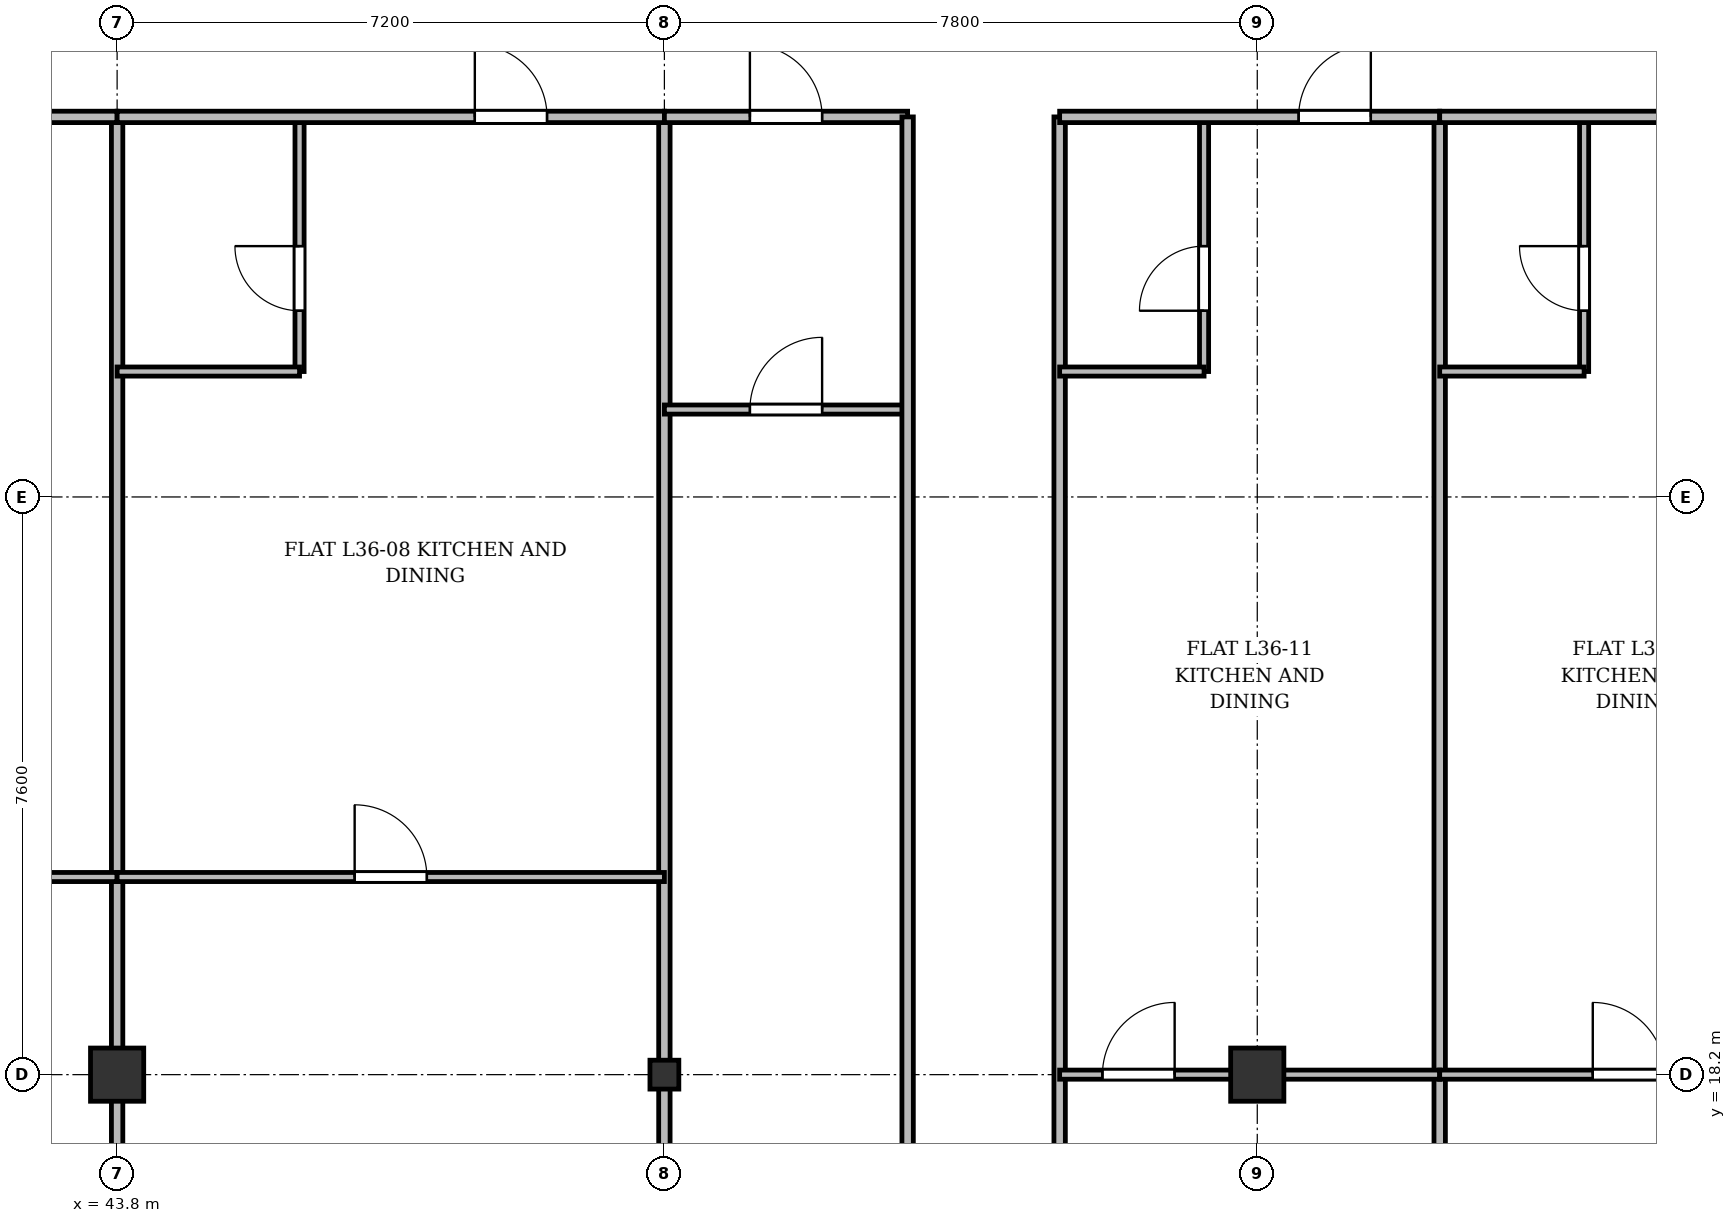
"""IFC4 building model, lengths in metres.
Left out: names, types, materials, properties, quantities, classifications, styles, units other than length and angle.
Written with IfcOpenShell. Run it as: python <this file> out.ifc"""

import sys

from ifc_helpers import new_model, si_unit, direction, frame, frame_2d, origin, origin_2d, place, context, subcontext, project, spatial, rectangle, i_section, extrude, source, transform, mapped, element, fill, save


model = new_model("IFC4")
c1 = context("Model", 3, precision=1e-05, world=origin(), true_north=direction((0.0, 1.0)))
c2 = subcontext(c1, "Body", "Model", "MODEL_VIEW")
j1 = project(units=[si_unit("LENGTHUNIT", "METRE"), si_unit("PLANEANGLEUNIT", "RADIAN")], contexts=[c1])
p1 = place(None, origin())
s1 = spatial("IfcSite", under=j1, at=p1, CompositionType="ELEMENT")
p2 = place(p1, origin())
s2 = spatial("IfcBuilding", under=s1, at=p2, CompositionType="ELEMENT")
p3 = place(p2, frame((0.0, 0.0, 139.3)))
s3 = spatial("IfcBuildingStorey", under=s2, at=p3, CompositionType="ELEMENT", Elevation=139.3)
m1 = source(origin(), c2, "Body", "SweptSolid", [
    extrude(rectangle(XDim=0.7, YDim=0.7, at=origin_2d()), origin(), (0.0, 0.0, 1.0), 3.6),
])
p4 = place(p3, frame((43.8, 18.2, 0.0), z_axis=(0.0, 0.0, 1.0), x_axis=(1.0, 0.0, 0.0)))
e1 = element("IfcColumn", 1, at=p4, inside=s3, PredefinedType="COLUMN", context=c2, shape_type="MappedRepresentation", body=[
    mapped(m1, transform((0.0, 0.0, 0.0), x_axis=(1.0, 0.0, 0.0), y_axis=(0.0, 1.0, 0.0), z_axis=(0.0, 0.0, 1.0), scale=1.0)),
])
m2 = source(origin(), c2, "Body", "SweptSolid", [
    extrude(i_section(OverallWidth=0.38, OverallDepth=0.38, WebThickness=0.02, FlangeThickness=0.03, at=origin_2d()), origin(), (0.0, 0.0, 1.0), 3.6),
])
p5 = place(p3, frame((51.0, 18.2, 0.0), z_axis=(0.0, 0.0, 1.0), x_axis=(1.0, 0.0, 0.0)))
e2 = element("IfcColumn", 2, at=p5, inside=s3, PredefinedType="COLUMN", context=c2, shape_type="MappedRepresentation", body=[
    mapped(m2, transform((0.0, 0.0, 0.0), x_axis=(1.0, 0.0, 0.0), y_axis=(0.0, 1.0, 0.0), z_axis=(0.0, 0.0, 1.0), scale=1.0)),
])
p6 = place(p3, frame((58.8, 18.2, 0.0), z_axis=(0.0, 0.0, 1.0), x_axis=(1.0, 0.0, 0.0)))
e3 = element("IfcColumn", 3, at=p6, inside=s3, PredefinedType="COLUMN", context=c2, shape_type="MappedRepresentation", body=[
    mapped(m1, transform((0.0, 0.0, 0.0), x_axis=(1.0, 0.0, 0.0), y_axis=(0.0, 1.0, 0.0), z_axis=(0.0, 0.0, 1.0), scale=1.0)),
])
for number, where, z_axis, x_axis in (
    (4, (43.8, 3.525, 0.0), (0.0, 0.0, 1.0), (0.0, 1.0, 0.0)),
    (5, (51.0, 3.525, 0.0), (0.0, 0.0, 1.0), (0.0, 1.0, 0.0)),
):
    element("IfcWall", number, at=place(p3, frame(where, z_axis=z_axis, x_axis=x_axis)), inside=s3, PredefinedType="PARTITIONING", context=c2, shape_type="SweptSolid", body=[
        extrude(rectangle(XDim=27.275, YDim=0.15, at=frame_2d((13.638, 0.0))), origin(), (0.0, 0.0, 1.0), 2.85),
    ])
p7 = place(p3, frame((61.2, 3.525, 0.0), z_axis=(0.0, 0.0, 1.0), x_axis=(0.0, 1.0, 0.0)))
e6 = element("IfcWall", 6, at=p7, inside=s3, PredefinedType="PARTITIONING", context=c2, shape_type="SweptSolid", body=[
    extrude(rectangle(XDim=27.275, YDim=0.15, at=frame_2d((13.638, 0.0))), origin(), (0.0, 0.0, 1.0), 2.75),
])
p8 = place(p3, frame((37.2, 20.8, 0.0), z_axis=(0.0, 0.0, 1.0), x_axis=(1.0, 0.0, 0.0)))
e7 = element("IfcWall", 7, at=p8, inside=s3, PredefinedType="PARTITIONING", context=c2, shape_type="SweptSolid", body=[
    extrude(rectangle(XDim=6.6, YDim=0.12, at=frame_2d((3.3, 0.0))), origin(), (0.0, 0.0, 1.0), 2.85),
])
p9 = place(p8, frame((2.734, 0.0, 0.0)))
e8 = element("IfcOpeningElement", 8, at=p9, cuts=e7, PredefinedType="OPENING", context=c2, shape_type="SweptSolid", body=[
    extrude(rectangle(XDim=0.95, YDim=2.15, at=frame_2d((0.475, 1.075))), frame((0.0, 0.07, 0.0), z_axis=(0.0, -1.0, 0.0), x_axis=(1.0, 0.0, 0.0)), (0.0, 0.0, 1.0), 0.14),
])
p10 = place(p3, frame((37.2, 30.8, 0.0), z_axis=(0.0, 0.0, 1.0), x_axis=(1.0, 0.0, 0.0)))
e9 = element("IfcWall", 9, at=p10, inside=s3, PredefinedType="PARTITIONING", context=c2, shape_type="SweptSolid", body=[
    extrude(rectangle(XDim=6.6, YDim=0.15, at=frame_2d((3.3, 0.0))), origin(), (0.0, 0.0, 1.0), 2.85),
])
p11 = place(p10, frame((4.337, 0.0, 0.0)))
e10 = element("IfcOpeningElement", 10, at=p11, cuts=e9, PredefinedType="OPENING", context=c2, shape_type="SweptSolid", body=[
    extrude(rectangle(XDim=0.95, YDim=2.15, at=frame_2d((0.475, 1.075))), frame((0.0, 0.085, 0.0), z_axis=(0.0, -1.0, 0.0), x_axis=(1.0, 0.0, 0.0)), (0.0, 0.0, 1.0), 0.17),
])
p12 = place(p3, frame((43.8, 20.8, 0.0), z_axis=(0.0, 0.0, 1.0), x_axis=(1.0, 0.0, 0.0)))
e11 = element("IfcWall", 11, at=p12, inside=s3, PredefinedType="PARTITIONING", context=c2, shape_type="SweptSolid", body=[
    extrude(rectangle(XDim=7.2, YDim=0.12, at=frame_2d((3.6, 0.0))), origin(), (0.0, 0.0, 1.0), 2.85),
])
p13 = place(p12, frame((3.125, 0.0, 0.0)))
e12 = element("IfcOpeningElement", 12, at=p13, cuts=e11, PredefinedType="OPENING", context=c2, shape_type="SweptSolid", body=[
    extrude(rectangle(XDim=0.95, YDim=2.15, at=frame_2d((0.475, 1.075))), frame((0.0, 0.07, 0.0), z_axis=(0.0, -1.0, 0.0), x_axis=(1.0, 0.0, 0.0)), (0.0, 0.0, 1.0), 0.14),
])
p14 = place(p3, frame((46.2, 27.45, 0.0), z_axis=(0.0, 0.0, 1.0), x_axis=(0.0, 1.0, 0.0)))
e13 = element("IfcWall", 13, at=p14, inside=s3, PredefinedType="PARTITIONING", context=c2, shape_type="SweptSolid", body=[
    extrude(rectangle(XDim=3.35, YDim=0.12, at=frame_2d((1.675, 0.0))), origin(), (0.0, 0.0, 1.0), 3.35),
])
p15 = place(p14, frame((0.8, 0.0, 0.0)))
e14 = element("IfcOpeningElement", 14, at=p15, cuts=e13, PredefinedType="OPENING", context=c2, shape_type="SweptSolid", body=[
    extrude(rectangle(XDim=0.85, YDim=2.1, at=frame_2d((0.425, 1.05))), frame((0.0, 0.07, 0.0), z_axis=(0.0, -1.0, 0.0), x_axis=(1.0, 0.0, 0.0)), (0.0, 0.0, 1.0), 0.14),
])
p16 = place(p3, frame((43.8, 27.45, 0.0), z_axis=(0.0, 0.0, 1.0), x_axis=(1.0, 0.0, 0.0)))
e15 = element("IfcWall", 15, at=p16, inside=s3, PredefinedType="PARTITIONING", context=c2, shape_type="SweptSolid", body=[
    extrude(rectangle(XDim=2.4, YDim=0.12, at=frame_2d((1.2, 0.0))), origin(), (0.0, 0.0, 1.0), 2.85),
])
p17 = place(p3, frame((43.8, 30.8, 0.0), z_axis=(0.0, 0.0, 1.0), x_axis=(1.0, 0.0, 0.0)))
e16 = element("IfcWall", 16, at=p17, inside=s3, PredefinedType="PARTITIONING", context=c2, shape_type="SweptSolid", body=[
    extrude(rectangle(XDim=7.2, YDim=0.15, at=frame_2d((3.6, 0.0))), origin(), (0.0, 0.0, 1.0), 2.85),
])
p18 = place(p17, frame((4.706, 0.0, 0.0)))
e17 = element("IfcOpeningElement", 17, at=p18, cuts=e16, PredefinedType="OPENING", context=c2, shape_type="SweptSolid", body=[
    extrude(rectangle(XDim=0.95, YDim=2.15, at=frame_2d((0.475, 1.075))), frame((0.0, 0.085, 0.0), z_axis=(0.0, -1.0, 0.0), x_axis=(1.0, 0.0, 0.0)), (0.0, 0.0, 1.0), 0.17),
])
p19 = place(p3, frame((51.0, 30.8, 0.0), z_axis=(0.0, 0.0, 1.0), x_axis=(1.0, 0.0, 0.0)))
e18 = element("IfcWall", 18, at=p19, inside=s3, PredefinedType="PARTITIONING", context=c2, shape_type="SweptSolid", body=[
    extrude(rectangle(XDim=3.2, YDim=0.15, at=frame_2d((1.6, 0.0))), origin(), (0.0, 0.0, 1.0), 2.85),
])
p20 = place(p19, frame((1.125, 0.0, 0.0)))
e19 = element("IfcOpeningElement", 19, at=p20, cuts=e18, PredefinedType="OPENING", context=c2, shape_type="SweptSolid", body=[
    extrude(rectangle(XDim=0.95, YDim=2.15, at=frame_2d((0.475, 1.075))), frame((0.0, 0.085, 0.0), z_axis=(0.0, -1.0, 0.0), x_axis=(1.0, 0.0, 0.0)), (0.0, 0.0, 1.0), 0.17),
])
p21 = place(p3, frame((51.0, 26.95, 0.0), z_axis=(0.0, 0.0, 1.0), x_axis=(1.0, 0.0, 0.0)))
e20 = element("IfcWall", 20, at=p21, inside=s3, PredefinedType="PARTITIONING", context=c2, shape_type="SweptSolid", body=[
    extrude(rectangle(XDim=3.2, YDim=0.12, at=frame_2d((1.6, 0.0))), origin(), (0.0, 0.0, 1.0), 2.85),
])
p22 = place(p21, frame((1.125, 0.0, 0.0)))
e21 = element("IfcOpeningElement", 21, at=p22, cuts=e20, PredefinedType="OPENING", context=c2, shape_type="SweptSolid", body=[
    extrude(rectangle(XDim=0.95, YDim=2.15, at=frame_2d((0.475, 1.075))), frame((0.0, 0.07, 0.0), z_axis=(0.0, -1.0, 0.0), x_axis=(1.0, 0.0, 0.0)), (0.0, 0.0, 1.0), 0.14),
])
for number, where, z_axis, x_axis in (
    (22, (54.2, 3.525, 0.0), (0.0, 0.0, 1.0), (0.0, 1.0, 0.0)),
    (23, (56.2, 3.525, 0.0), (0.0, 0.0, 1.0), (0.0, 1.0, 0.0)),
):
    element("IfcWall", number, at=place(p3, frame(where, z_axis=z_axis, x_axis=x_axis)), inside=s3, PredefinedType="PARTITIONING", context=c2, shape_type="SweptSolid", body=[
        extrude(rectangle(XDim=27.275, YDim=0.15, at=frame_2d((13.638, 0.0))), origin(), (0.0, 0.0, 1.0), 2.75),
    ])
p23 = place(p3, frame((56.2, 18.2, 0.0), z_axis=(0.0, 0.0, 1.0), x_axis=(1.0, 0.0, 0.0)))
e24 = element("IfcWall", 24, at=p23, inside=s3, PredefinedType="PARTITIONING", context=c2, shape_type="SweptSolid", body=[
    extrude(rectangle(XDim=5.0, YDim=0.12, at=frame_2d((2.5, 0.0))), origin(), (0.0, 0.0, 1.0), 2.75),
])
p24 = place(p23, frame((0.563, 0.0, 0.0)))
e25 = element("IfcOpeningElement", 25, at=p24, cuts=e24, PredefinedType="OPENING", context=c2, shape_type="SweptSolid", body=[
    extrude(rectangle(XDim=0.95, YDim=2.15, at=frame_2d((0.475, 1.075))), frame((0.0, 0.07, 0.0), z_axis=(0.0, -1.0, 0.0), x_axis=(1.0, 0.0, 0.0)), (0.0, 0.0, 1.0), 0.14),
])
p25 = place(p3, frame((58.1, 27.45, 0.0), z_axis=(0.0, 0.0, 1.0), x_axis=(0.0, 1.0, 0.0)))
e26 = element("IfcWall", 26, at=p25, inside=s3, PredefinedType="PARTITIONING", context=c2, shape_type="SweptSolid", body=[
    extrude(rectangle(XDim=3.35, YDim=0.12, at=frame_2d((1.675, 0.0))), origin(), (0.0, 0.0, 1.0), 3.35),
])
p26 = place(p25, frame((0.8, 0.0, 0.0)))
e27 = element("IfcOpeningElement", 27, at=p26, cuts=e26, PredefinedType="OPENING", context=c2, shape_type="SweptSolid", body=[
    extrude(rectangle(XDim=0.85, YDim=2.1, at=frame_2d((0.425, 1.05))), frame((0.0, 0.07, 0.0), z_axis=(0.0, -1.0, 0.0), x_axis=(1.0, 0.0, 0.0)), (0.0, 0.0, 1.0), 0.14),
])
p27 = place(p3, frame((56.2, 27.45, 0.0), z_axis=(0.0, 0.0, 1.0), x_axis=(1.0, 0.0, 0.0)))
e28 = element("IfcWall", 28, at=p27, inside=s3, PredefinedType="PARTITIONING", context=c2, shape_type="SweptSolid", body=[
    extrude(rectangle(XDim=1.9, YDim=0.12, at=frame_2d((0.95, 0.0))), origin(), (0.0, 0.0, 1.0), 3.35),
])
p28 = place(p3, frame((56.2, 30.8, 0.0), z_axis=(0.0, 0.0, 1.0), x_axis=(1.0, 0.0, 0.0)))
e29 = element("IfcWall", 29, at=p28, inside=s3, PredefinedType="PARTITIONING", context=c2, shape_type="SweptSolid", body=[
    extrude(rectangle(XDim=5.0, YDim=0.15, at=frame_2d((2.5, 0.0))), origin(), (0.0, 0.0, 1.0), 2.85),
])
p29 = place(p28, frame((3.144, 0.0, 0.0)))
e30 = element("IfcOpeningElement", 30, at=p29, cuts=e29, PredefinedType="OPENING", context=c2, shape_type="SweptSolid", body=[
    extrude(rectangle(XDim=0.95, YDim=2.15, at=frame_2d((0.475, 1.075))), frame((0.0, 0.085, 0.0), z_axis=(0.0, -1.0, 0.0), x_axis=(1.0, 0.0, 0.0)), (0.0, 0.0, 1.0), 0.17),
])
p30 = place(p3, frame((61.2, 18.2, 0.0), z_axis=(0.0, 0.0, 1.0), x_axis=(1.0, 0.0, 0.0)))
e31 = element("IfcWall", 31, at=p30, inside=s3, PredefinedType="PARTITIONING", context=c2, shape_type="SweptSolid", body=[
    extrude(rectangle(XDim=5.16, YDim=0.12, at=frame_2d((2.58, 0.0))), origin(), (0.0, 0.0, 1.0), 2.75),
])
p31 = place(p30, frame((2.014, 0.0, 0.0)))
e32 = element("IfcOpeningElement", 32, at=p31, cuts=e31, PredefinedType="OPENING", context=c2, shape_type="SweptSolid", body=[
    extrude(rectangle(XDim=0.95, YDim=2.15, at=frame_2d((0.475, 1.075))), frame((0.0, 0.07, 0.0), z_axis=(0.0, -1.0, 0.0), x_axis=(1.0, 0.0, 0.0)), (0.0, 0.0, 1.0), 0.14),
])
p32 = place(p3, frame((63.1, 27.45, 0.0), z_axis=(0.0, 0.0, 1.0), x_axis=(0.0, 1.0, 0.0)))
e33 = element("IfcWall", 33, at=p32, inside=s3, PredefinedType="PARTITIONING", context=c2, shape_type="SweptSolid", body=[
    extrude(rectangle(XDim=3.35, YDim=0.12, at=frame_2d((1.675, 0.0))), origin(), (0.0, 0.0, 1.0), 3.35),
])
p33 = place(p32, frame((0.8, 0.0, 0.0)))
e34 = element("IfcOpeningElement", 34, at=p33, cuts=e33, PredefinedType="OPENING", context=c2, shape_type="SweptSolid", body=[
    extrude(rectangle(XDim=0.85, YDim=2.1, at=frame_2d((0.425, 1.05))), frame((0.0, 0.07, 0.0), z_axis=(0.0, -1.0, 0.0), x_axis=(1.0, 0.0, 0.0)), (0.0, 0.0, 1.0), 0.14),
])
p34 = place(p3, frame((61.2, 27.45, 0.0), z_axis=(0.0, 0.0, 1.0), x_axis=(1.0, 0.0, 0.0)))
e35 = element("IfcWall", 35, at=p34, inside=s3, PredefinedType="PARTITIONING", context=c2, shape_type="SweptSolid", body=[
    extrude(rectangle(XDim=1.9, YDim=0.12, at=frame_2d((0.95, 0.0))), origin(), (0.0, 0.0, 1.0), 3.35),
])
p35 = place(p3, frame((61.2, 30.8, 0.0), z_axis=(0.0, 0.0, 1.0), x_axis=(1.0, 0.0, 0.0)))
e36 = element("IfcWall", 36, at=p35, inside=s3, PredefinedType="PARTITIONING", context=c2, shape_type="SweptSolid", body=[
    extrude(rectangle(XDim=5.175, YDim=0.15, at=frame_2d((2.587, 0.0))), origin(), (0.0, 0.0, 1.0), 2.85),
])
p36 = place(p35, frame((3.244, 0.0, 0.0)))
e37 = element("IfcOpeningElement", 37, at=p36, cuts=e36, PredefinedType="OPENING", context=c2, shape_type="SweptSolid", body=[
    extrude(rectangle(XDim=0.95, YDim=2.15, at=frame_2d((0.475, 1.075))), frame((0.0, 0.085, 0.0), z_axis=(0.0, -1.0, 0.0), x_axis=(1.0, 0.0, 0.0)), (0.0, 0.0, 1.0), 0.17),
])
m3 = source(origin(), c2, "Body", "SweptSolid", [
    extrude(rectangle(XDim=0.95, YDim=2.15, at=frame_2d((0.475, 1.075))), frame((0.0, 0.025, 0.0), z_axis=(0.0, -1.0, 0.0), x_axis=(1.0, 0.0, 0.0)), (0.0, 0.0, 1.0), 0.05),
])
p37 = place(p13, origin())
e38 = element("IfcDoor", 38, at=p37, inside=s3, OperationType="SINGLE_SWING_LEFT", PredefinedType="DOOR", context=c2, shape_type="MappedRepresentation", body=[
    mapped(m3, transform((0.0, 0.0, 0.0), x_axis=(1.0, 0.0, 0.0), y_axis=(0.0, 1.0, 0.0), z_axis=(0.0, 0.0, 1.0), scale=1.0)),
])
fill(e12, e38)
m4 = source(origin(), c2, "Body", "SweptSolid", [
    extrude(rectangle(XDim=0.85, YDim=2.1, at=frame_2d((0.425, 1.05))), frame((0.0, 0.025, 0.0), z_axis=(0.0, -1.0, 0.0), x_axis=(1.0, 0.0, 0.0)), (0.0, 0.0, 1.0), 0.05),
])
p38 = place(p15, origin())
e39 = element("IfcDoor", 39, at=p38, inside=s3, OperationType="SINGLE_SWING_RIGHT", PredefinedType="DOOR", context=c2, shape_type="MappedRepresentation", body=[
    mapped(m4, transform((0.0, 0.0, 0.0), x_axis=(1.0, 0.0, 0.0), y_axis=(0.0, 1.0, 0.0), z_axis=(0.0, 0.0, 1.0), scale=1.0)),
])
fill(e14, e39)
p39 = place(p18, origin())
e40 = element("IfcDoor", 40, at=p39, inside=s3, OperationType="SINGLE_SWING_LEFT", PredefinedType="DOOR", context=c2, shape_type="MappedRepresentation", body=[
    mapped(m3, transform((0.0, 0.0, 0.0), x_axis=(1.0, 0.0, 0.0), y_axis=(0.0, 1.0, 0.0), z_axis=(0.0, 0.0, 1.0), scale=1.0)),
])
fill(e17, e40)
p40 = place(p20, origin())
e41 = element("IfcDoor", 41, at=p40, inside=s3, OperationType="SINGLE_SWING_LEFT", PredefinedType="DOOR", context=c2, shape_type="MappedRepresentation", body=[
    mapped(m3, transform((0.0, 0.0, 0.0), x_axis=(1.0, 0.0, 0.0), y_axis=(0.0, 1.0, 0.0), z_axis=(0.0, 0.0, 1.0), scale=1.0)),
])
fill(e19, e41)
p41 = place(p22, origin())
e42 = element("IfcDoor", 42, at=p41, inside=s3, OperationType="SINGLE_SWING_RIGHT", PredefinedType="DOOR", context=c2, shape_type="MappedRepresentation", body=[
    mapped(m3, transform((0.0, 0.0, 0.0), x_axis=(1.0, 0.0, 0.0), y_axis=(0.0, 1.0, 0.0), z_axis=(0.0, 0.0, 1.0), scale=1.0)),
])
fill(e21, e42)
p42 = place(p24, origin())
e43 = element("IfcDoor", 43, at=p42, inside=s3, OperationType="SINGLE_SWING_RIGHT", PredefinedType="DOOR", context=c2, shape_type="MappedRepresentation", body=[
    mapped(m3, transform((0.0, 0.0, 0.0), x_axis=(1.0, 0.0, 0.0), y_axis=(0.0, 1.0, 0.0), z_axis=(0.0, 0.0, 1.0), scale=1.0)),
])
fill(e25, e43)
p43 = place(p26, origin())
e44 = element("IfcDoor", 44, at=p43, inside=s3, OperationType="SINGLE_SWING_LEFT", PredefinedType="DOOR", context=c2, shape_type="MappedRepresentation", body=[
    mapped(m4, transform((0.0, 0.0, 0.0), x_axis=(1.0, 0.0, 0.0), y_axis=(0.0, 1.0, 0.0), z_axis=(0.0, 0.0, 1.0), scale=1.0)),
])
fill(e27, e44)
p44 = place(p29, origin())
e45 = element("IfcDoor", 45, at=p44, inside=s3, OperationType="SINGLE_SWING_RIGHT", PredefinedType="DOOR", context=c2, shape_type="MappedRepresentation", body=[
    mapped(m3, transform((0.0, 0.0, 0.0), x_axis=(1.0, 0.0, 0.0), y_axis=(0.0, 1.0, 0.0), z_axis=(0.0, 0.0, 1.0), scale=1.0)),
])
fill(e30, e45)
p45 = place(p31, origin())
e46 = element("IfcDoor", 46, at=p45, inside=s3, OperationType="SINGLE_SWING_LEFT", PredefinedType="DOOR", context=c2, shape_type="MappedRepresentation", body=[
    mapped(m3, transform((0.0, 0.0, 0.0), x_axis=(1.0, 0.0, 0.0), y_axis=(0.0, 1.0, 0.0), z_axis=(0.0, 0.0, 1.0), scale=1.0)),
])
fill(e32, e46)
p46 = place(p33, origin())
e47 = element("IfcDoor", 47, at=p46, inside=s3, OperationType="SINGLE_SWING_RIGHT", PredefinedType="DOOR", context=c2, shape_type="MappedRepresentation", body=[
    mapped(m4, transform((0.0, 0.0, 0.0), x_axis=(1.0, 0.0, 0.0), y_axis=(0.0, 1.0, 0.0), z_axis=(0.0, 0.0, 1.0), scale=1.0)),
])
fill(e34, e47)
save(model, sys.argv[1])
